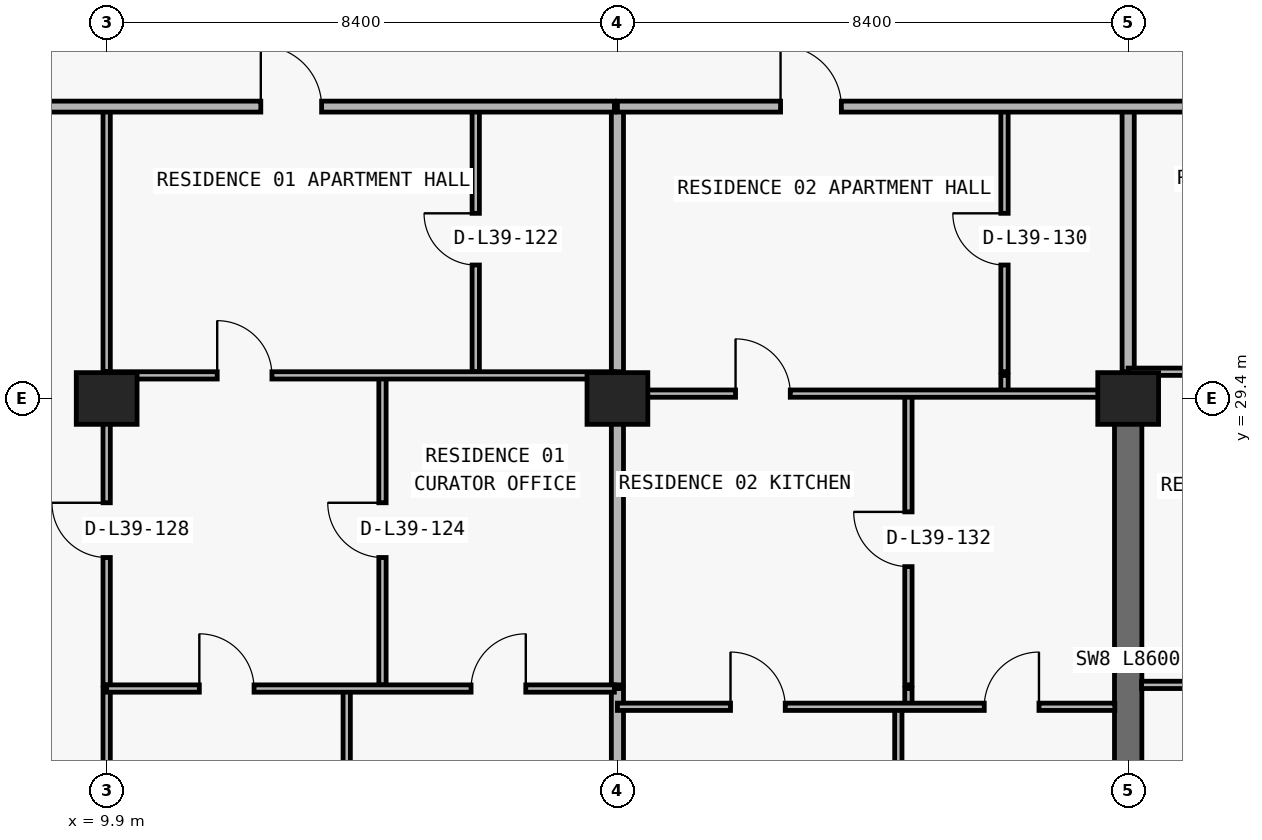
"""IFC4 building model, lengths in metres.
Left out: names, types, materials, properties, quantities, classifications, styles, units other than length and angle.
Written with IfcOpenShell. Run it as: python <this file> out.ifc"""

import sys

from ifc_helpers import new_model, si_unit, direction, frame, frame_2d, origin, origin_2d, place, context, subcontext, project, spatial, rectangle, extrude, element, fill, save


model = new_model("IFC4")
c1 = context("Model", 3, precision=1e-05, world=origin(), true_north=direction((0.0, 1.0)))
c2 = subcontext(c1, "Body", "Model", "MODEL_VIEW")
j1 = project(units=[si_unit("LENGTHUNIT", "METRE"), si_unit("PLANEANGLEUNIT", "RADIAN")], contexts=[c1])
p1 = place(None, origin())
s1 = spatial("IfcSite", under=j1, at=p1, CompositionType="ELEMENT")
p2 = place(p1, origin())
s2 = spatial("IfcBuilding", under=s1, at=p2, CompositionType="ELEMENT")
p3 = place(p2, frame((0.0, 0.0, 142.2)))
s3 = spatial("IfcBuildingStorey", under=s2, at=p3, CompositionType="ELEMENT", Elevation=142.2)
for number, where, z_axis, x_axis in (
    (1, (9.9, 29.4, 0.0), (0.0, 0.0, 1.0), (1.0, 0.0, 0.0)),
    (2, (18.3, 29.4, 0.0), (0.0, 0.0, 1.0), (1.0, 0.0, 0.0)),
    (3, (26.7, 29.4, 0.0), (0.0, 0.0, 1.0), (1.0, 0.0, 0.0)),
):
    element("IfcColumn", number, at=place(p3, frame(where, z_axis=z_axis, x_axis=x_axis)), inside=s3, PredefinedType="COLUMN", context=c2, shape_type="SweptSolid", body=[
        extrude(rectangle(XDim=1.0, YDim=0.85, at=origin_2d()), origin(), (0.0, 0.0, 1.0), 3.05),
    ])
p4 = place(p3, frame((26.7, 20.8, 0.0), z_axis=(0.0, 0.0, 1.0), x_axis=(0.0, 1.0, 0.0)))
e4 = element("IfcWall", 4, at=p4, inside=s3, PredefinedType="SHEAR", context=c2, shape_type="SweptSolid", body=[
    extrude(rectangle(XDim=8.6, YDim=0.45, at=frame_2d((4.3, 0.0))), origin(), (0.0, 0.0, 1.0), 3.05),
])
p5 = place(p3, frame((9.9, 8.84, 0.0), z_axis=(0.0, 0.0, 1.0), x_axis=(0.0, 1.0, 0.0)))
e5 = element("IfcWall", 5, at=p5, inside=s3, PredefinedType="PARTITIONING", context=c2, shape_type="SweptSolid", body=[
    extrude(rectangle(XDim=15.79, YDim=0.12, at=frame_2d((7.895, 0.0))), origin(), (0.0, 0.0, 1.0), 2.174),
])
p6 = place(p3, frame((9.9, 24.69, 0.0), z_axis=(0.0, 0.0, 1.0), x_axis=(0.0, 1.0, 0.0)))
e6 = element("IfcWall", 6, at=p6, inside=s3, PredefinedType="PARTITIONING", context=c2, shape_type="SweptSolid", body=[
    extrude(rectangle(XDim=5.09, YDim=0.12, at=frame_2d((2.545, 0.0))), origin(), (0.0, 0.0, 1.0), 2.174),
])
p7 = place(p6, frame((2.095, 0.0, 0.0)))
e7 = element("IfcOpeningElement", 7, at=p7, cuts=e6, PredefinedType="OPENING", context=c2, shape_type="SweptSolid", body=[
    extrude(rectangle(XDim=0.9, YDim=2.124, at=frame_2d((0.45, 1.062))), frame((0.0, 0.07, 0.0), z_axis=(0.0, -1.0, 0.0), x_axis=(1.0, 0.0, 0.0)), (0.0, 0.0, 1.0), 0.14),
])
p8 = place(p3, frame((9.9, 29.84, 0.0), z_axis=(0.0, 0.0, 1.0), x_axis=(0.0, 1.0, 0.0)))
e8 = element("IfcWall", 8, at=p8, inside=s3, PredefinedType="PARTITIONING", context=c2, shape_type="SweptSolid", body=[
    extrude(rectangle(XDim=4.36, YDim=0.12, at=frame_2d((2.18, 0.0))), origin(), (0.0, 0.0, 1.0), 2.174),
])
p9 = place(p3, frame((13.848, 8.84, 0.0), z_axis=(0.0, 0.0, 1.0), x_axis=(0.0, 1.0, 0.0)))
e9 = element("IfcWall", 9, at=p9, inside=s3, PredefinedType="PARTITIONING", context=c2, shape_type="SweptSolid", body=[
    extrude(rectangle(XDim=15.79, YDim=0.12, at=frame_2d((7.895, 0.0))), origin(), (0.0, 0.0, 1.0), 3.05),
])
p10 = place(p3, frame((14.436, 24.69, 0.0), z_axis=(0.0, 0.0, 1.0), x_axis=(0.0, 1.0, 0.0)))
e10 = element("IfcWall", 10, at=p10, inside=s3, PredefinedType="PARTITIONING", context=c2, shape_type="SweptSolid", body=[
    extrude(rectangle(XDim=5.09, YDim=0.12, at=frame_2d((2.545, 0.0))), origin(), (0.0, 0.0, 1.0), 3.05),
])
p11 = place(p10, frame((2.095, 0.0, 0.0)))
e11 = element("IfcOpeningElement", 11, at=p11, cuts=e10, PredefinedType="OPENING", context=c2, shape_type="SweptSolid", body=[
    extrude(rectangle(XDim=0.9, YDim=2.15, at=frame_2d((0.45, 1.075))), frame((0.0, 0.07, 0.0), z_axis=(0.0, -1.0, 0.0), x_axis=(1.0, 0.0, 0.0)), (0.0, 0.0, 1.0), 0.14),
])
p12 = place(p3, frame((15.97, 29.84, 0.0), z_axis=(0.0, 0.0, 1.0), x_axis=(0.0, 1.0, 0.0)))
e12 = element("IfcWall", 12, at=p12, inside=s3, PredefinedType="PARTITIONING", context=c2, shape_type="SweptSolid", body=[
    extrude(rectangle(XDim=4.36, YDim=0.12, at=frame_2d((2.18, 0.0))), origin(), (0.0, 0.0, 1.0), 3.05),
])
p13 = place(p12, frame((1.755, 0.0, 0.0)))
e13 = element("IfcOpeningElement", 13, at=p13, cuts=e12, PredefinedType="OPENING", context=c2, shape_type="SweptSolid", body=[
    extrude(rectangle(XDim=0.85, YDim=2.1, at=frame_2d((0.425, 1.05))), frame((0.0, 0.07, 0.0), z_axis=(0.0, -1.0, 0.0), x_axis=(1.0, 0.0, 0.0)), (0.0, 0.0, 1.0), 0.14),
])
p14 = place(p3, frame((18.3, 8.84, 0.0), z_axis=(0.0, 0.0, 1.0), x_axis=(0.0, 1.0, 0.0)))
e14 = element("IfcWall", 14, at=p14, inside=s3, PredefinedType="PARTITIONING", context=c2, shape_type="SweptSolid", body=[
    extrude(rectangle(XDim=15.79, YDim=0.2, at=frame_2d((7.895, 0.0))), origin(), (0.0, 0.0, 1.0), 2.174),
])
p15 = place(p3, frame((18.3, 24.69, 0.0), z_axis=(0.0, 0.0, 1.0), x_axis=(0.0, 1.0, 0.0)))
e15 = element("IfcWall", 15, at=p15, inside=s3, PredefinedType="PARTITIONING", context=c2, shape_type="SweptSolid", body=[
    extrude(rectangle(XDim=5.09, YDim=0.2, at=frame_2d((2.545, 0.0))), origin(), (0.0, 0.0, 1.0), 2.174),
])
p16 = place(p3, frame((18.3, 29.84, 0.0), z_axis=(0.0, 0.0, 1.0), x_axis=(0.0, 1.0, 0.0)))
e16 = element("IfcWall", 16, at=p16, inside=s3, PredefinedType="PARTITIONING", context=c2, shape_type="SweptSolid", body=[
    extrude(rectangle(XDim=4.36, YDim=0.2, at=frame_2d((2.18, 0.0))), origin(), (0.0, 0.0, 1.0), 2.174),
])
p17 = place(p3, frame((22.92, 8.84, 0.0), z_axis=(0.0, 0.0, 1.0), x_axis=(0.0, 1.0, 0.0)))
e17 = element("IfcWall", 17, at=p17, inside=s3, PredefinedType="PARTITIONING", context=c2, shape_type="SweptSolid", body=[
    extrude(rectangle(XDim=15.49, YDim=0.12, at=frame_2d((7.745, 0.0))), origin(), (0.0, 0.0, 1.0), 3.05),
])
p18 = place(p3, frame((23.086, 24.335, 0.0), z_axis=(0.0, 0.0, 1.0), x_axis=(0.0, 1.0, 0.0)))
e18 = element("IfcWall", 18, at=p18, inside=s3, PredefinedType="PARTITIONING", context=c2, shape_type="SweptSolid", body=[
    extrude(rectangle(XDim=0.295, YDim=0.12, at=frame_2d((0.147, 0.0))), origin(), (0.0, 0.0, 1.0), 3.05),
])
p19 = place(p3, frame((23.086, 24.69, 0.0), z_axis=(0.0, 0.0, 1.0), x_axis=(0.0, 1.0, 0.0)))
e19 = element("IfcWall", 19, at=p19, inside=s3, PredefinedType="PARTITIONING", context=c2, shape_type="SweptSolid", body=[
    extrude(rectangle(XDim=4.79, YDim=0.12, at=frame_2d((2.395, 0.0))), origin(), (0.0, 0.0, 1.0), 3.05),
])
p20 = place(p19, frame((1.945, 0.0, 0.0)))
e20 = element("IfcOpeningElement", 20, at=p20, cuts=e19, PredefinedType="OPENING", context=c2, shape_type="SweptSolid", body=[
    extrude(rectangle(XDim=0.9, YDim=2.15, at=frame_2d((0.45, 1.075))), frame((0.0, 0.07, 0.0), z_axis=(0.0, -1.0, 0.0), x_axis=(1.0, 0.0, 0.0)), (0.0, 0.0, 1.0), 0.14),
])
p21 = place(p3, frame((24.666, 29.48, 0.0), z_axis=(0.0, 0.0, 1.0), x_axis=(0.0, 1.0, 0.0)))
e21 = element("IfcWall", 21, at=p21, inside=s3, PredefinedType="PARTITIONING", context=c2, shape_type="SweptSolid", body=[
    extrude(rectangle(XDim=0.3, YDim=0.12, at=frame_2d((0.15, 0.0))), origin(), (0.0, 0.0, 1.0), 3.05),
])
p22 = place(p3, frame((24.666, 29.84, 0.0), z_axis=(0.0, 0.0, 1.0), x_axis=(0.0, 1.0, 0.0)))
e22 = element("IfcWall", 22, at=p22, inside=s3, PredefinedType="PARTITIONING", context=c2, shape_type="SweptSolid", body=[
    extrude(rectangle(XDim=4.36, YDim=0.12, at=frame_2d((2.18, 0.0))), origin(), (0.0, 0.0, 1.0), 3.05),
])
p23 = place(p22, frame((1.755, 0.0, 0.0)))
e23 = element("IfcOpeningElement", 23, at=p23, cuts=e22, PredefinedType="OPENING", context=c2, shape_type="SweptSolid", body=[
    extrude(rectangle(XDim=0.85, YDim=2.1, at=frame_2d((0.425, 1.05))), frame((0.0, 0.07, 0.0), z_axis=(0.0, -1.0, 0.0), x_axis=(1.0, 0.0, 0.0)), (0.0, 0.0, 1.0), 0.14),
])
p24 = place(p3, frame((26.7, 29.405, 0.0), z_axis=(0.0, 0.0, 1.0), x_axis=(0.0, 1.0, 0.0)))
e24 = element("IfcWall", 24, at=p24, inside=s3, PredefinedType="PARTITIONING", context=c2, shape_type="SweptSolid", body=[
    extrude(rectangle(XDim=0.375, YDim=0.2, at=frame_2d((0.188, 0.0))), origin(), (0.0, 0.0, 1.0), 3.05),
])
p25 = place(p3, frame((26.7, 29.84, 0.0), z_axis=(0.0, 0.0, 1.0), x_axis=(0.0, 1.0, 0.0)))
e25 = element("IfcWall", 25, at=p25, inside=s3, PredefinedType="PARTITIONING", context=c2, shape_type="SweptSolid", body=[
    extrude(rectangle(XDim=4.36, YDim=0.2, at=frame_2d((2.18, 0.0))), origin(), (0.0, 0.0, 1.0), 2.335),
])
p26 = place(p3, frame((18.3, 24.33, 0.0), z_axis=(0.0, 0.0, 1.0), x_axis=(1.0, 0.0, 0.0)))
e26 = element("IfcWall", 26, at=p26, inside=s3, PredefinedType="PARTITIONING", context=c2, shape_type="SweptSolid", body=[
    extrude(rectangle(XDim=8.18, YDim=0.12, at=frame_2d((4.09, 0.0))), origin(), (0.0, 0.0, 1.0), 3.05),
])
p27 = place(p26, frame((1.86, 0.0, 0.0)))
e27 = element("IfcOpeningElement", 27, at=p27, cuts=e26, PredefinedType="OPENING", context=c2, shape_type="SweptSolid", body=[
    extrude(rectangle(XDim=0.9, YDim=2.15, at=frame_2d((0.45, 1.075))), frame((0.0, 0.07, 0.0), z_axis=(0.0, -1.0, 0.0), x_axis=(1.0, 0.0, 0.0)), (0.0, 0.0, 1.0), 0.14),
])
p28 = place(p26, frame((6.033, 0.0, 0.0)))
e28 = element("IfcOpeningElement", 28, at=p28, cuts=e26, PredefinedType="OPENING", context=c2, shape_type="SweptSolid", body=[
    extrude(rectangle(XDim=0.9, YDim=2.15, at=frame_2d((0.45, 1.075))), frame((0.0, 0.07, 0.0), z_axis=(0.0, -1.0, 0.0), x_axis=(1.0, 0.0, 0.0)), (0.0, 0.0, 1.0), 0.14),
])
p29 = place(p3, frame((9.9, 24.63, 0.0), z_axis=(0.0, 0.0, 1.0), x_axis=(1.0, 0.0, 0.0)))
e29 = element("IfcWall", 29, at=p29, inside=s3, PredefinedType="PARTITIONING", context=c2, shape_type="SweptSolid", body=[
    extrude(rectangle(XDim=8.35, YDim=0.12, at=frame_2d((4.175, 0.0))), origin(), (0.0, 0.0, 1.0), 3.05),
])
p30 = place(p29, frame((1.524, 0.0, 0.0)))
e30 = element("IfcOpeningElement", 30, at=p30, cuts=e29, PredefinedType="OPENING", context=c2, shape_type="SweptSolid", body=[
    extrude(rectangle(XDim=0.9, YDim=2.15, at=frame_2d((0.45, 1.075))), frame((0.0, 0.07, 0.0), z_axis=(0.0, -1.0, 0.0), x_axis=(1.0, 0.0, 0.0)), (0.0, 0.0, 1.0), 0.14),
])
p31 = place(p29, frame((5.993, 0.0, 0.0)))
e31 = element("IfcOpeningElement", 31, at=p31, cuts=e29, PredefinedType="OPENING", context=c2, shape_type="SweptSolid", body=[
    extrude(rectangle(XDim=0.9, YDim=2.15, at=frame_2d((0.45, 1.075))), frame((0.0, 0.07, 0.0), z_axis=(0.0, -1.0, 0.0), x_axis=(1.0, 0.0, 0.0)), (0.0, 0.0, 1.0), 0.14),
])
p32 = place(p3, frame((26.92, 24.69, 0.0), z_axis=(0.0, 0.0, 1.0), x_axis=(1.0, 0.0, 0.0)))
e32 = element("IfcWall", 32, at=p32, inside=s3, PredefinedType="PARTITIONING", context=c2, shape_type="SweptSolid", body=[
    extrude(rectangle(XDim=8.18, YDim=0.12, at=frame_2d((4.09, 0.0))), origin(), (0.0, 0.0, 1.0), 3.05),
])
p33 = place(p32, frame((1.414, 0.0, 0.0)))
e33 = element("IfcOpeningElement", 33, at=p33, cuts=e32, PredefinedType="OPENING", context=c2, shape_type="SweptSolid", body=[
    extrude(rectangle(XDim=0.9, YDim=2.15, at=frame_2d((0.45, 1.075))), frame((0.0, 0.07, 0.0), z_axis=(0.0, -1.0, 0.0), x_axis=(1.0, 0.0, 0.0)), (0.0, 0.0, 1.0), 0.14),
])
p34 = place(p32, frame((5.673, 0.0, 0.0)))
e34 = element("IfcOpeningElement", 34, at=p34, cuts=e32, PredefinedType="OPENING", context=c2, shape_type="SweptSolid", body=[
    extrude(rectangle(XDim=0.9, YDim=2.15, at=frame_2d((0.45, 1.075))), frame((0.0, 0.07, 0.0), z_axis=(0.0, -1.0, 0.0), x_axis=(1.0, 0.0, 0.0)), (0.0, 0.0, 1.0), 0.14),
])
p35 = place(p3, frame((18.3, 29.48, 0.0), z_axis=(0.0, 0.0, 1.0), x_axis=(1.0, 0.0, 0.0)))
e35 = element("IfcWall", 35, at=p35, inside=s3, PredefinedType="PARTITIONING", context=c2, shape_type="SweptSolid", body=[
    extrude(rectangle(XDim=8.18, YDim=0.12, at=frame_2d((4.09, 0.0))), origin(), (0.0, 0.0, 1.0), 2.174),
])
p36 = place(p35, frame((1.943, 0.0, 0.0)))
e36 = element("IfcOpeningElement", 36, at=p36, cuts=e35, PredefinedType="OPENING", context=c2, shape_type="SweptSolid", body=[
    extrude(rectangle(XDim=0.9, YDim=2.124, at=frame_2d((0.45, 1.062))), frame((0.0, 0.07, 0.0), z_axis=(0.0, -1.0, 0.0), x_axis=(1.0, 0.0, 0.0)), (0.0, 0.0, 1.0), 0.14),
])
p37 = place(p3, frame((9.9, 29.78, 0.0), z_axis=(0.0, 0.0, 1.0), x_axis=(1.0, 0.0, 0.0)))
e37 = element("IfcWall", 37, at=p37, inside=s3, PredefinedType="PARTITIONING", context=c2, shape_type="SweptSolid", body=[
    extrude(rectangle(XDim=8.35, YDim=0.12, at=frame_2d((4.175, 0.0))), origin(), (0.0, 0.0, 1.0), 3.05),
])
p38 = place(p37, frame((1.818, 0.0, 0.0)))
e38 = element("IfcOpeningElement", 38, at=p38, cuts=e37, PredefinedType="OPENING", context=c2, shape_type="SweptSolid", body=[
    extrude(rectangle(XDim=0.9, YDim=2.15, at=frame_2d((0.45, 1.075))), frame((0.0, 0.07, 0.0), z_axis=(0.0, -1.0, 0.0), x_axis=(1.0, 0.0, 0.0)), (0.0, 0.0, 1.0), 0.14),
])
p39 = place(p3, frame((26.7, 29.84, 0.0), z_axis=(0.0, 0.0, 1.0), x_axis=(1.0, 0.0, 0.0)))
e39 = element("IfcWall", 39, at=p39, inside=s3, PredefinedType="PARTITIONING", context=c2, shape_type="SweptSolid", body=[
    extrude(rectangle(XDim=8.4, YDim=0.12, at=frame_2d((4.2, 0.0))), origin(), (0.0, 0.0, 1.0), 3.05),
])
p40 = place(p39, frame((1.693, 0.0, 0.0)))
e40 = element("IfcOpeningElement", 40, at=p40, cuts=e39, PredefinedType="OPENING", context=c2, shape_type="SweptSolid", body=[
    extrude(rectangle(XDim=0.9, YDim=2.15, at=frame_2d((0.45, 1.075))), frame((0.0, 0.07, 0.0), z_axis=(0.0, -1.0, 0.0), x_axis=(1.0, 0.0, 0.0)), (0.0, 0.0, 1.0), 0.14),
])
p41 = place(p3, frame((7.705, 34.2, 0.0), z_axis=(0.0, 0.0, 1.0), x_axis=(1.0, 0.0, 0.0)))
e41 = element("IfcWall", 41, at=p41, inside=s3, PredefinedType="PARTITIONING", context=c2, shape_type="SweptSolid", body=[
    extrude(rectangle(XDim=10.545, YDim=0.18, at=frame_2d((5.272, 0.0))), origin(), (0.0, 0.0, 1.0), 3.05),
])
p42 = place(p41, frame((4.73, 0.0, 0.0)))
e42 = element("IfcOpeningElement", 42, at=p42, cuts=e41, PredefinedType="OPENING", context=c2, shape_type="SweptSolid", body=[
    extrude(rectangle(XDim=1.0, YDim=2.2, at=frame_2d((0.5, 1.1))), frame((0.0, 0.1, 0.0), z_axis=(0.0, -1.0, 0.0), x_axis=(1.0, 0.0, 0.0)), (0.0, 0.0, 1.0), 0.2),
])
p43 = place(p3, frame((18.3, 34.2, 0.0), z_axis=(0.0, 0.0, 1.0), x_axis=(1.0, 0.0, 0.0)))
e43 = element("IfcWall", 43, at=p43, inside=s3, PredefinedType="PARTITIONING", context=c2, shape_type="SweptSolid", body=[
    extrude(rectangle(XDim=41.2, YDim=0.18, at=frame_2d((20.6, 0.0))), origin(), (0.0, 0.0, 1.0), 3.05),
])
p44 = place(p43, frame((2.683, 0.0, 0.0)))
e44 = element("IfcOpeningElement", 44, at=p44, cuts=e43, PredefinedType="OPENING", context=c2, shape_type="SweptSolid", body=[
    extrude(rectangle(XDim=1.0, YDim=2.2, at=frame_2d((0.5, 1.1))), frame((0.0, 0.1, 0.0), z_axis=(0.0, -1.0, 0.0), x_axis=(1.0, 0.0, 0.0)), (0.0, 0.0, 1.0), 0.2),
])
p45 = place(p43, frame((10.919, 0.0, 0.0)))
e45 = element("IfcOpeningElement", 45, at=p45, cuts=e43, PredefinedType="OPENING", context=c2, shape_type="SweptSolid", body=[
    extrude(rectangle(XDim=1.0, YDim=2.2, at=frame_2d((0.5, 1.1))), frame((0.0, 0.1, 0.0), z_axis=(0.0, -1.0, 0.0), x_axis=(1.0, 0.0, 0.0)), (0.0, 0.0, 1.0), 0.2),
])
p46 = place(p43, frame((19.192, 0.0, 0.0)))
e46 = element("IfcOpeningElement", 46, at=p46, cuts=e43, PredefinedType="OPENING", context=c2, shape_type="SweptSolid", body=[
    extrude(rectangle(XDim=1.0, YDim=2.2, at=frame_2d((0.5, 1.1))), frame((0.0, 0.1, 0.0), z_axis=(0.0, -1.0, 0.0), x_axis=(1.0, 0.0, 0.0)), (0.0, 0.0, 1.0), 0.2),
])
p47 = place(p43, frame((35.546, 0.0, 0.0)))
e47 = element("IfcOpeningElement", 47, at=p47, cuts=e43, PredefinedType="OPENING", context=c2, shape_type="SweptSolid", body=[
    extrude(rectangle(XDim=1.0, YDim=2.2, at=frame_2d((0.5, 1.1))), frame((0.0, 0.1, 0.0), z_axis=(0.0, -1.0, 0.0), x_axis=(1.0, 0.0, 0.0)), (0.0, 0.0, 1.0), 0.2),
])
p48 = place(p42, origin())
e48 = element("IfcDoor", 48, at=p48, inside=s3, OperationType="SINGLE_SWING_LEFT", PredefinedType="DOOR", context=c2, shape_type="SweptSolid", body=[
    extrude(rectangle(XDim=1.0, YDim=2.2, at=frame_2d((0.5, 1.1))), frame((0.0, 0.025, 0.0), z_axis=(0.0, -1.0, 0.0), x_axis=(1.0, 0.0, 0.0)), (0.0, 0.0, 1.0), 0.05),
])
fill(e42, e48)
p49 = place(p13, origin())
e49 = element("IfcDoor", 49, at=p49, inside=s3, OperationType="SINGLE_SWING_RIGHT", PredefinedType="DOOR", context=c2, shape_type="SweptSolid", body=[
    extrude(rectangle(XDim=0.85, YDim=2.1, at=frame_2d((0.425, 1.05))), frame((0.0, 0.025, 0.0), z_axis=(0.0, -1.0, 0.0), x_axis=(1.0, 0.0, 0.0)), (0.0, 0.0, 1.0), 0.05),
])
fill(e13, e49)
p50 = place(p38, origin())
e50 = element("IfcDoor", 50, at=p50, inside=s3, OperationType="SINGLE_SWING_LEFT", PredefinedType="DOOR", context=c2, shape_type="SweptSolid", body=[
    extrude(rectangle(XDim=0.9, YDim=2.15, at=frame_2d((0.45, 1.075))), frame((0.0, 0.025, 0.0), z_axis=(0.0, -1.0, 0.0), x_axis=(1.0, 0.0, 0.0)), (0.0, 0.0, 1.0), 0.05),
])
fill(e38, e50)
p51 = place(p11, origin())
e51 = element("IfcDoor", 51, at=p51, inside=s3, OperationType="SINGLE_SWING_RIGHT", PredefinedType="DOOR", context=c2, shape_type="SweptSolid", body=[
    extrude(rectangle(XDim=0.9, YDim=2.15, at=frame_2d((0.45, 1.075))), frame((0.0, 0.025, 0.0), z_axis=(0.0, -1.0, 0.0), x_axis=(1.0, 0.0, 0.0)), (0.0, 0.0, 1.0), 0.05),
])
fill(e11, e51)
p52 = place(p30, origin())
e52 = element("IfcDoor", 52, at=p52, inside=s3, OperationType="SINGLE_SWING_LEFT", PredefinedType="DOOR", context=c2, shape_type="SweptSolid", body=[
    extrude(rectangle(XDim=0.9, YDim=2.15, at=frame_2d((0.45, 1.075))), frame((0.0, 0.025, 0.0), z_axis=(0.0, -1.0, 0.0), x_axis=(1.0, 0.0, 0.0)), (0.0, 0.0, 1.0), 0.05),
])
fill(e30, e52)
p53 = place(p31, origin())
e53 = element("IfcDoor", 53, at=p53, inside=s3, OperationType="SINGLE_SWING_RIGHT", PredefinedType="DOOR", context=c2, shape_type="SweptSolid", body=[
    extrude(rectangle(XDim=0.9, YDim=2.15, at=frame_2d((0.45, 1.075))), frame((0.0, 0.025, 0.0), z_axis=(0.0, -1.0, 0.0), x_axis=(1.0, 0.0, 0.0)), (0.0, 0.0, 1.0), 0.05),
])
fill(e31, e53)
p54 = place(p7, origin())
e54 = element("IfcDoor", 54, at=p54, inside=s3, OperationType="SINGLE_SWING_RIGHT", PredefinedType="DOOR", context=c2, shape_type="SweptSolid", body=[
    extrude(rectangle(XDim=0.9, YDim=2.124, at=frame_2d((0.45, 1.062))), frame((0.0, 0.025, 0.0), z_axis=(0.0, -1.0, 0.0), x_axis=(1.0, 0.0, 0.0)), (0.0, 0.0, 1.0), 0.05),
])
fill(e7, e54)
p55 = place(p44, origin())
e55 = element("IfcDoor", 55, at=p55, inside=s3, OperationType="SINGLE_SWING_LEFT", PredefinedType="DOOR", context=c2, shape_type="SweptSolid", body=[
    extrude(rectangle(XDim=1.0, YDim=2.2, at=frame_2d((0.5, 1.1))), frame((0.0, 0.025, 0.0), z_axis=(0.0, -1.0, 0.0), x_axis=(1.0, 0.0, 0.0)), (0.0, 0.0, 1.0), 0.05),
])
fill(e44, e55)
p56 = place(p23, origin())
e56 = element("IfcDoor", 56, at=p56, inside=s3, OperationType="SINGLE_SWING_RIGHT", PredefinedType="DOOR", context=c2, shape_type="SweptSolid", body=[
    extrude(rectangle(XDim=0.85, YDim=2.1, at=frame_2d((0.425, 1.05))), frame((0.0, 0.025, 0.0), z_axis=(0.0, -1.0, 0.0), x_axis=(1.0, 0.0, 0.0)), (0.0, 0.0, 1.0), 0.05),
])
fill(e23, e56)
p57 = place(p36, origin())
e57 = element("IfcDoor", 57, at=p57, inside=s3, OperationType="SINGLE_SWING_LEFT", PredefinedType="DOOR", context=c2, shape_type="SweptSolid", body=[
    extrude(rectangle(XDim=0.9, YDim=2.124, at=frame_2d((0.45, 1.062))), frame((0.0, 0.025, 0.0), z_axis=(0.0, -1.0, 0.0), x_axis=(1.0, 0.0, 0.0)), (0.0, 0.0, 1.0), 0.05),
])
fill(e36, e57)
p58 = place(p20, origin())
e58 = element("IfcDoor", 58, at=p58, inside=s3, OperationType="SINGLE_SWING_RIGHT", PredefinedType="DOOR", context=c2, shape_type="SweptSolid", body=[
    extrude(rectangle(XDim=0.9, YDim=2.15, at=frame_2d((0.45, 1.075))), frame((0.0, 0.025, 0.0), z_axis=(0.0, -1.0, 0.0), x_axis=(1.0, 0.0, 0.0)), (0.0, 0.0, 1.0), 0.05),
])
fill(e20, e58)
p59 = place(p27, origin())
e59 = element("IfcDoor", 59, at=p59, inside=s3, OperationType="SINGLE_SWING_LEFT", PredefinedType="DOOR", context=c2, shape_type="SweptSolid", body=[
    extrude(rectangle(XDim=0.9, YDim=2.15, at=frame_2d((0.45, 1.075))), frame((0.0, 0.025, 0.0), z_axis=(0.0, -1.0, 0.0), x_axis=(1.0, 0.0, 0.0)), (0.0, 0.0, 1.0), 0.05),
])
fill(e27, e59)
p60 = place(p28, origin())
e60 = element("IfcDoor", 60, at=p60, inside=s3, OperationType="SINGLE_SWING_RIGHT", PredefinedType="DOOR", context=c2, shape_type="SweptSolid", body=[
    extrude(rectangle(XDim=0.9, YDim=2.15, at=frame_2d((0.45, 1.075))), frame((0.0, 0.025, 0.0), z_axis=(0.0, -1.0, 0.0), x_axis=(1.0, 0.0, 0.0)), (0.0, 0.0, 1.0), 0.05),
])
fill(e28, e60)
save(model, sys.argv[1])
